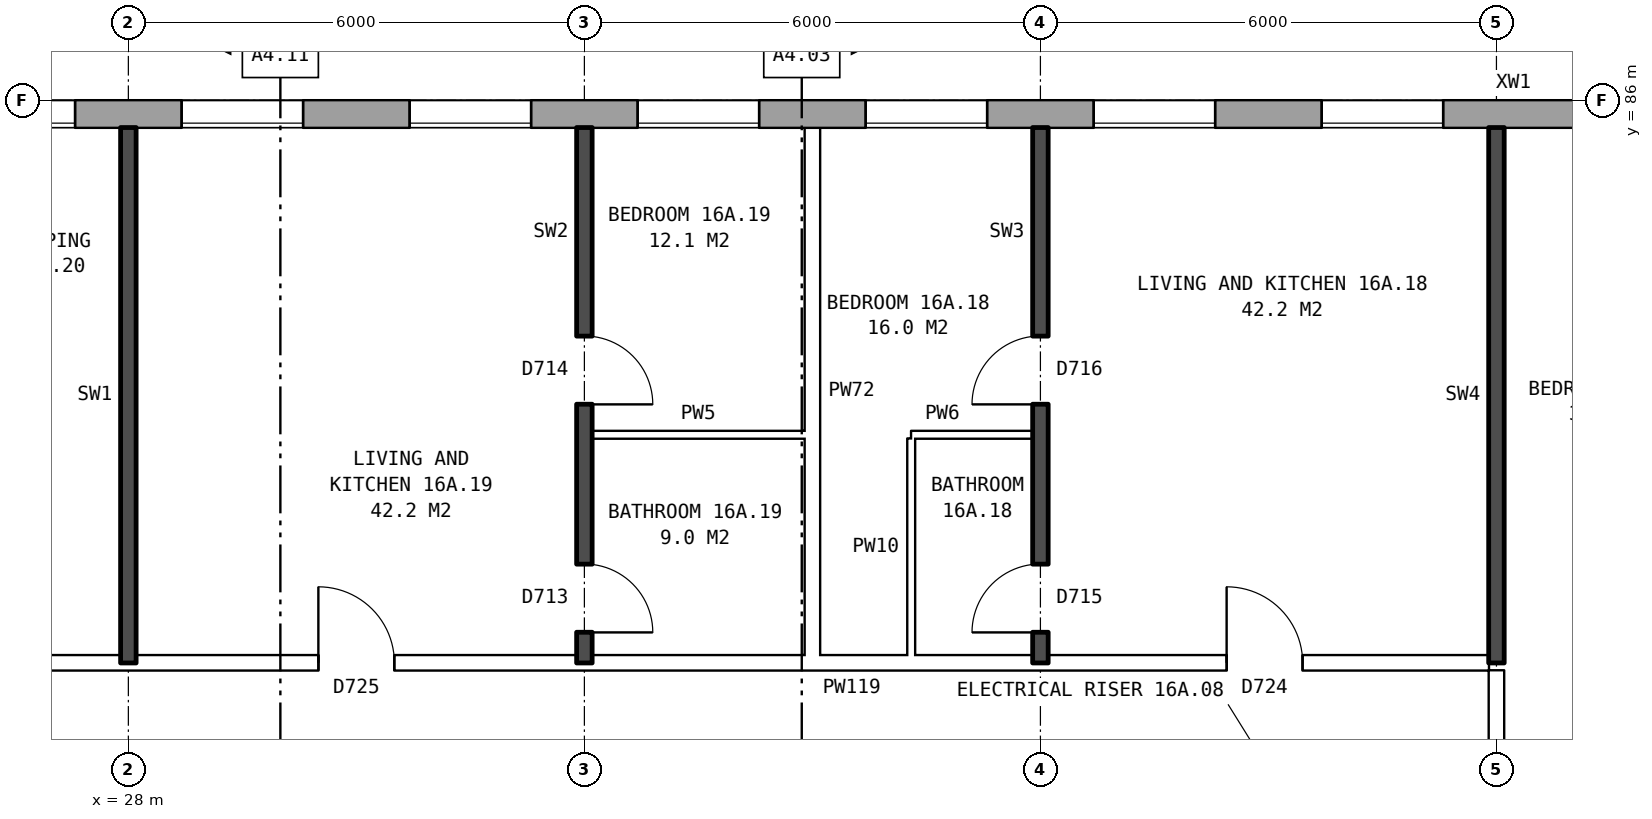
"""IFC4 building model, lengths in metres.
Left out: names, types, materials, properties, quantities, classifications, styles, units other than length and angle.
Written with IfcOpenShell. Run it as: python <this file> out.ifc"""

import sys

from ifc_helpers import new_model, si_unit, direction, frame, frame_2d, origin, place, context, subcontext, project, spatial, rectangle, extrude, element, fill, save


model = new_model("IFC4")
c1 = context("Model", 3, precision=1e-05, world=origin(), true_north=direction((0.0, 1.0)))
c2 = subcontext(c1, "Body", "Model", "MODEL_VIEW")
j1 = project(units=[si_unit("LENGTHUNIT", "METRE"), si_unit("PLANEANGLEUNIT", "RADIAN")], contexts=[c1])
p1 = place(None, origin())
s1 = spatial("IfcSite", under=j1, at=p1, CompositionType="ELEMENT")
p2 = place(p1, origin())
s2 = spatial("IfcBuilding", under=s1, at=p2, CompositionType="ELEMENT")
p3 = place(p2, frame((0.0, 0.0, 59.8)))
s3 = spatial("IfcBuildingStorey", under=s2, at=p3, CompositionType="ELEMENT", Elevation=59.8)
p4 = place(p3, frame((72.925, 85.82, 0.0), z_axis=(0.0, 0.0, 1.0), x_axis=(-1.0, 0.0, 0.0)))
e1 = element("IfcWall", 1, at=p4, inside=s3, PredefinedType="STANDARD", context=c2, shape_type="SweptSolid", body=[
    extrude(rectangle(XDim=48.351, YDim=0.36, at=frame_2d((24.175, 0.0))), origin(), (0.0, 0.0, 1.0), 2.85),
])
p5 = place(p4, frame((0.625, 0.0, 0.8)))
e2 = element("IfcOpeningElement", 2, at=p5, cuts=e1, PredefinedType="OPENING", context=c2, shape_type="SweptSolid", body=[
    extrude(rectangle(XDim=1.6, YDim=1.8, at=frame_2d((0.8, 0.9))), frame((0.0, 0.19, 0.0), z_axis=(0.0, -1.0, 0.0), x_axis=(1.0, 0.0, 0.0)), (0.0, 0.0, 1.0), 0.38),
])
p6 = place(p4, frame((3.625, 0.0, 0.8)))
e3 = element("IfcOpeningElement", 3, at=p6, cuts=e1, PredefinedType="OPENING", context=c2, shape_type="SweptSolid", body=[
    extrude(rectangle(XDim=1.6, YDim=1.8, at=frame_2d((0.8, 0.9))), frame((0.0, 0.19, 0.0), z_axis=(0.0, -1.0, 0.0), x_axis=(1.0, 0.0, 0.0)), (0.0, 0.0, 1.0), 0.38),
])
p7 = place(p4, frame((6.625, 0.0, 0.8)))
e4 = element("IfcOpeningElement", 4, at=p7, cuts=e1, PredefinedType="OPENING", context=c2, shape_type="SweptSolid", body=[
    extrude(rectangle(XDim=1.6, YDim=1.8, at=frame_2d((0.8, 0.9))), frame((0.0, 0.19, 0.0), z_axis=(0.0, -1.0, 0.0), x_axis=(1.0, 0.0, 0.0)), (0.0, 0.0, 1.0), 0.38),
])
p8 = place(p4, frame((9.625, 0.0, 0.8)))
e5 = element("IfcOpeningElement", 5, at=p8, cuts=e1, PredefinedType="OPENING", context=c2, shape_type="SweptSolid", body=[
    extrude(rectangle(XDim=1.6, YDim=1.8, at=frame_2d((0.8, 0.9))), frame((0.0, 0.19, 0.0), z_axis=(0.0, -1.0, 0.0), x_axis=(1.0, 0.0, 0.0)), (0.0, 0.0, 1.0), 0.38),
])
p9 = place(p4, frame((12.625, 0.0, 0.8)))
e6 = element("IfcOpeningElement", 6, at=p9, cuts=e1, PredefinedType="OPENING", context=c2, shape_type="SweptSolid", body=[
    extrude(rectangle(XDim=1.6, YDim=1.8, at=frame_2d((0.8, 0.9))), frame((0.0, 0.19, 0.0), z_axis=(0.0, -1.0, 0.0), x_axis=(1.0, 0.0, 0.0)), (0.0, 0.0, 1.0), 0.38),
])
p10 = place(p4, frame((15.625, 0.0, 0.8)))
e7 = element("IfcOpeningElement", 7, at=p10, cuts=e1, PredefinedType="OPENING", context=c2, shape_type="SweptSolid", body=[
    extrude(rectangle(XDim=1.6, YDim=1.8, at=frame_2d((0.8, 0.9))), frame((0.0, 0.19, 0.0), z_axis=(0.0, -1.0, 0.0), x_axis=(1.0, 0.0, 0.0)), (0.0, 0.0, 1.0), 0.38),
])
p11 = place(p4, frame((18.625, 0.0, 0.8)))
e8 = element("IfcOpeningElement", 8, at=p11, cuts=e1, PredefinedType="OPENING", context=c2, shape_type="SweptSolid", body=[
    extrude(rectangle(XDim=1.6, YDim=1.8, at=frame_2d((0.8, 0.9))), frame((0.0, 0.19, 0.0), z_axis=(0.0, -1.0, 0.0), x_axis=(1.0, 0.0, 0.0)), (0.0, 0.0, 1.0), 0.38),
])
p12 = place(p4, frame((21.125, 0.0, 1.65)))
e9 = element("IfcOpeningElement", 9, at=p12, cuts=e1, PredefinedType="OPENING", context=c2, shape_type="SweptSolid", body=[
    extrude(rectangle(XDim=0.8, YDim=0.9, at=frame_2d((0.4, 0.45))), frame((0.0, 0.19, 0.0), z_axis=(0.0, -1.0, 0.0), x_axis=(1.0, 0.0, 0.0)), (0.0, 0.0, 1.0), 0.38),
])
p13 = place(p4, frame((24.075, 0.0, 0.25)))
e10 = element("IfcOpeningElement", 10, at=p13, cuts=e1, PredefinedType="OPENING", context=c2, shape_type="SweptSolid", body=[
    extrude(rectangle(XDim=0.8, YDim=1.5, at=frame_2d((0.4, 0.75))), frame((0.0, 0.19, 0.0), z_axis=(0.0, -1.0, 0.0), x_axis=(1.0, 0.0, 0.0)), (0.0, 0.0, 1.0), 0.38),
])
p14 = place(p4, frame((27.625, 0.0, 0.8)))
e11 = element("IfcOpeningElement", 11, at=p14, cuts=e1, PredefinedType="OPENING", context=c2, shape_type="SweptSolid", body=[
    extrude(rectangle(XDim=1.6, YDim=1.8, at=frame_2d((0.8, 0.9))), frame((0.0, 0.19, 0.0), z_axis=(0.0, -1.0, 0.0), x_axis=(1.0, 0.0, 0.0)), (0.0, 0.0, 1.0), 0.38),
])
p15 = place(p4, frame((30.625, 0.0, 0.8)))
e12 = element("IfcOpeningElement", 12, at=p15, cuts=e1, PredefinedType="OPENING", context=c2, shape_type="SweptSolid", body=[
    extrude(rectangle(XDim=1.6, YDim=1.8, at=frame_2d((0.8, 0.9))), frame((0.0, 0.19, 0.0), z_axis=(0.0, -1.0, 0.0), x_axis=(1.0, 0.0, 0.0)), (0.0, 0.0, 1.0), 0.38),
])
p16 = place(p4, frame((33.625, 0.0, 0.8)))
e13 = element("IfcOpeningElement", 13, at=p16, cuts=e1, PredefinedType="OPENING", context=c2, shape_type="SweptSolid", body=[
    extrude(rectangle(XDim=1.6, YDim=1.8, at=frame_2d((0.8, 0.9))), frame((0.0, 0.19, 0.0), z_axis=(0.0, -1.0, 0.0), x_axis=(1.0, 0.0, 0.0)), (0.0, 0.0, 1.0), 0.38),
])
p17 = place(p4, frame((36.625, 0.0, 0.8)))
e14 = element("IfcOpeningElement", 14, at=p17, cuts=e1, PredefinedType="OPENING", context=c2, shape_type="SweptSolid", body=[
    extrude(rectangle(XDim=1.6, YDim=1.8, at=frame_2d((0.8, 0.9))), frame((0.0, 0.19, 0.0), z_axis=(0.0, -1.0, 0.0), x_axis=(1.0, 0.0, 0.0)), (0.0, 0.0, 1.0), 0.38),
])
p18 = place(p4, frame((39.625, 0.0, 0.8)))
e15 = element("IfcOpeningElement", 15, at=p18, cuts=e1, PredefinedType="OPENING", context=c2, shape_type="SweptSolid", body=[
    extrude(rectangle(XDim=1.6, YDim=1.8, at=frame_2d((0.8, 0.9))), frame((0.0, 0.19, 0.0), z_axis=(0.0, -1.0, 0.0), x_axis=(1.0, 0.0, 0.0)), (0.0, 0.0, 1.0), 0.38),
])
p19 = place(p4, frame((42.625, 0.0, 0.8)))
e16 = element("IfcOpeningElement", 16, at=p19, cuts=e1, PredefinedType="OPENING", context=c2, shape_type="SweptSolid", body=[
    extrude(rectangle(XDim=1.6, YDim=1.8, at=frame_2d((0.8, 0.9))), frame((0.0, 0.19, 0.0), z_axis=(0.0, -1.0, 0.0), x_axis=(1.0, 0.0, 0.0)), (0.0, 0.0, 1.0), 0.38),
])
p20 = place(p4, frame((45.625, 0.0, 0.8)))
e17 = element("IfcOpeningElement", 17, at=p20, cuts=e1, PredefinedType="OPENING", context=c2, shape_type="SweptSolid", body=[
    extrude(rectangle(XDim=1.6, YDim=1.8, at=frame_2d((0.8, 0.9))), frame((0.0, 0.19, 0.0), z_axis=(0.0, -1.0, 0.0), x_axis=(1.0, 0.0, 0.0)), (0.0, 0.0, 1.0), 0.38),
])
p21 = place(p4, frame((22.425, 0.0, 0.15)))
e18 = element("IfcOpeningElement", 18, at=p21, cuts=e1, PredefinedType="OPENING", context=c2, shape_type="SweptSolid", body=[
    extrude(rectangle(XDim=1.2, YDim=0.9, at=frame_2d((0.6, 0.45))), frame((0.0, 0.19, 0.0), z_axis=(0.0, -1.0, 0.0), x_axis=(1.0, 0.0, 0.0)), (0.0, 0.0, 1.0), 0.38),
])
p22 = place(p4, frame((25.175, 0.0, 0.25)))
e19 = element("IfcOpeningElement", 19, at=p22, cuts=e1, PredefinedType="OPENING", context=c2, shape_type="SweptSolid", body=[
    extrude(rectangle(XDim=0.6, YDim=0.9, at=frame_2d((0.3, 0.45))), frame((0.0, 0.19, 0.0), z_axis=(0.0, -1.0, 0.0), x_axis=(1.0, 0.0, 0.0)), (0.0, 0.0, 1.0), 0.38),
])
p23 = place(p3, frame((21.86, 78.6, 0.0), z_axis=(0.0, 0.0, 1.0), x_axis=(1.0, 0.0, 0.0)))
e20 = element("IfcWall", 20, at=p23, inside=s3, PredefinedType="PARTITIONING", context=c2, shape_type="SweptSolid", body=[
    extrude(rectangle(XDim=24.04, YDim=0.2, at=frame_2d((12.02, 0.0))), origin(), (0.0, 0.0, 1.0), 2.85),
])
p24 = place(p23, frame((20.59, 0.0, 0.0)))
e21 = element("IfcOpeningElement", 21, at=p24, cuts=e20, PredefinedType="OPENING", context=c2, shape_type="SweptSolid", body=[
    extrude(rectangle(XDim=1.0, YDim=2.1, at=frame_2d((0.5, 1.05))), frame((0.0, 0.11, 0.0), z_axis=(0.0, -1.0, 0.0), x_axis=(1.0, 0.0, 0.0)), (0.0, 0.0, 1.0), 0.22),
])
p25 = place(p23, frame((8.64, 0.0, 0.0)))
e22 = element("IfcOpeningElement", 22, at=p25, cuts=e20, PredefinedType="OPENING", context=c2, shape_type="SweptSolid", body=[
    extrude(rectangle(XDim=1.0, YDim=2.1, at=frame_2d((0.5, 1.05))), frame((0.0, 0.11, 0.0), z_axis=(0.0, -1.0, 0.0), x_axis=(1.0, 0.0, 0.0)), (0.0, 0.0, 1.0), 0.22),
])
p26 = place(p23, frame((3.64, 0.0, 0.0)))
e23 = element("IfcOpeningElement", 23, at=p26, cuts=e20, PredefinedType="OPENING", context=c2, shape_type="SweptSolid", body=[
    extrude(rectangle(XDim=1.0, YDim=2.1, at=frame_2d((0.5, 1.05))), frame((0.0, 0.11, 0.0), z_axis=(0.0, -1.0, 0.0), x_axis=(1.0, 0.0, 0.0)), (0.0, 0.0, 1.0), 0.22),
])
p27 = place(p3, frame((34.1, 81.6, 0.0), z_axis=(0.0, 0.0, 1.0), x_axis=(1.0, 0.0, 0.0)))
e24 = element("IfcWall", 24, at=p27, inside=s3, PredefinedType="PARTITIONING", context=c2, shape_type="SweptSolid", body=[
    extrude(rectangle(XDim=2.8, YDim=0.1, at=frame_2d((1.4, 0.0))), origin(), (0.0, 0.0, 1.0), 2.85),
])
p28 = place(p3, frame((38.3, 81.6, 0.0), z_axis=(0.0, 0.0, 1.0), x_axis=(1.0, 0.0, 0.0)))
e25 = element("IfcWall", 25, at=p28, inside=s3, PredefinedType="PARTITIONING", context=c2, shape_type="SweptSolid", body=[
    extrude(rectangle(XDim=1.6, YDim=0.1, at=frame_2d((0.8, 0.0))), origin(), (0.0, 0.0, 1.0), 2.85),
])
p29 = place(p3, frame((28.0, 78.6, 0.0), z_axis=(0.0, 0.0, 1.0), x_axis=(0.0, 1.0, 0.0)))
e26 = element("IfcWall", 26, at=p29, inside=s3, PredefinedType="SOLIDWALL", context=c2, shape_type="SweptSolid", body=[
    extrude(rectangle(XDim=7.04, YDim=0.2, at=frame_2d((3.52, 0.0))), origin(), (0.0, 0.0, 1.0), 2.85),
])
p30 = place(p3, frame((34.0, 78.6, 0.0), z_axis=(0.0, 0.0, 1.0), x_axis=(0.0, 1.0, 0.0)))
e27 = element("IfcWall", 27, at=p30, inside=s3, PredefinedType="SOLIDWALL", context=c2, shape_type="SweptSolid", body=[
    extrude(rectangle(XDim=7.04, YDim=0.2, at=frame_2d((3.52, 0.0))), origin(), (0.0, 0.0, 1.0), 2.85),
])
p31 = place(p30, frame((3.4, 0.0, 0.0)))
e28 = element("IfcOpeningElement", 28, at=p31, cuts=e27, PredefinedType="OPENING", context=c2, shape_type="SweptSolid", body=[
    extrude(rectangle(XDim=0.9, YDim=2.1, at=frame_2d((0.45, 1.05))), frame((0.0, 0.11, 0.0), z_axis=(0.0, -1.0, 0.0), x_axis=(1.0, 0.0, 0.0)), (0.0, 0.0, 1.0), 0.22),
])
p32 = place(p30, frame((0.4, 0.0, 0.0)))
e29 = element("IfcOpeningElement", 29, at=p32, cuts=e27, PredefinedType="OPENING", context=c2, shape_type="SweptSolid", body=[
    extrude(rectangle(XDim=0.9, YDim=2.1, at=frame_2d((0.45, 1.05))), frame((0.0, 0.11, 0.0), z_axis=(0.0, -1.0, 0.0), x_axis=(1.0, 0.0, 0.0)), (0.0, 0.0, 1.0), 0.22),
])
p33 = place(p3, frame((37.0, 78.7, 0.0), z_axis=(0.0, 0.0, 1.0), x_axis=(0.0, 1.0, 0.0)))
e30 = element("IfcWall", 30, at=p33, inside=s3, PredefinedType="PARTITIONING", context=c2, shape_type="SweptSolid", body=[
    extrude(rectangle(XDim=6.94, YDim=0.2, at=frame_2d((3.47, 0.0))), origin(), (0.0, 0.0, 1.0), 2.85),
])
p34 = place(p3, frame((38.3, 78.7, 0.0), z_axis=(0.0, 0.0, 1.0), x_axis=(0.0, 1.0, 0.0)))
e31 = element("IfcWall", 31, at=p34, inside=s3, PredefinedType="PARTITIONING", context=c2, shape_type="SweptSolid", body=[
    extrude(rectangle(XDim=2.85, YDim=0.1, at=frame_2d((1.425, 0.0))), origin(), (0.0, 0.0, 1.0), 2.85),
])
p35 = place(p3, frame((40.0, 78.6, 0.0), z_axis=(0.0, 0.0, 1.0), x_axis=(0.0, 1.0, 0.0)))
e32 = element("IfcWall", 32, at=p35, inside=s3, PredefinedType="SOLIDWALL", context=c2, shape_type="SweptSolid", body=[
    extrude(rectangle(XDim=7.04, YDim=0.2, at=frame_2d((3.52, 0.0))), origin(), (0.0, 0.0, 1.0), 2.85),
])
p36 = place(p35, frame((3.4, 0.0, 0.0)))
e33 = element("IfcOpeningElement", 33, at=p36, cuts=e32, PredefinedType="OPENING", context=c2, shape_type="SweptSolid", body=[
    extrude(rectangle(XDim=0.9, YDim=2.1, at=frame_2d((0.45, 1.05))), frame((0.0, 0.11, 0.0), z_axis=(0.0, -1.0, 0.0), x_axis=(1.0, 0.0, 0.0)), (0.0, 0.0, 1.0), 0.22),
])
p37 = place(p35, frame((0.4, 0.0, 0.0)))
e34 = element("IfcOpeningElement", 34, at=p37, cuts=e32, PredefinedType="OPENING", context=c2, shape_type="SweptSolid", body=[
    extrude(rectangle(XDim=0.9, YDim=2.1, at=frame_2d((0.45, 1.05))), frame((0.0, 0.11, 0.0), z_axis=(0.0, -1.0, 0.0), x_axis=(1.0, 0.0, 0.0)), (0.0, 0.0, 1.0), 0.22),
])
p38 = place(p3, frame((46.0, 76.3, 0.0), z_axis=(0.0, 0.0, 1.0), x_axis=(0.0, 1.0, 0.0)))
e35 = element("IfcWall", 35, at=p38, inside=s3, PredefinedType="PARTITIONING", context=c2, shape_type="SweptSolid", body=[
    extrude(rectangle(XDim=2.2, YDim=0.2, at=frame_2d((1.1, 0.0))), origin(), (0.0, 0.0, 1.0), 2.85),
])
p39 = place(p3, frame((46.0, 78.6, 0.0), z_axis=(0.0, 0.0, 1.0), x_axis=(0.0, 1.0, 0.0)))
e36 = element("IfcWall", 36, at=p39, inside=s3, PredefinedType="SOLIDWALL", context=c2, shape_type="SweptSolid", body=[
    extrude(rectangle(XDim=7.04, YDim=0.2, at=frame_2d((3.52, 0.0))), origin(), (0.0, 0.0, 1.0), 2.85),
])
p40 = place(p14, origin())
e37 = element("IfcWindow", 37, at=p40, inside=s3, PartitioningType="SINGLE_PANEL", PredefinedType="WINDOW", context=c2, shape_type="SweptSolid", body=[
    extrude(rectangle(XDim=1.6, YDim=1.8, at=frame_2d((0.8, 0.9))), frame((0.0, 0.15, 0.0), z_axis=(0.0, -1.0, 0.0), x_axis=(1.0, 0.0, 0.0)), (0.0, 0.0, 1.0), 0.06),
])
fill(e11, e37)
p41 = place(p15, origin())
e38 = element("IfcWindow", 38, at=p41, inside=s3, PartitioningType="SINGLE_PANEL", PredefinedType="WINDOW", context=c2, shape_type="SweptSolid", body=[
    extrude(rectangle(XDim=1.6, YDim=1.8, at=frame_2d((0.8, 0.9))), frame((0.0, 0.15, 0.0), z_axis=(0.0, -1.0, 0.0), x_axis=(1.0, 0.0, 0.0)), (0.0, 0.0, 1.0), 0.06),
])
fill(e12, e38)
p42 = place(p16, origin())
e39 = element("IfcWindow", 39, at=p42, inside=s3, PartitioningType="SINGLE_PANEL", PredefinedType="WINDOW", context=c2, shape_type="SweptSolid", body=[
    extrude(rectangle(XDim=1.6, YDim=1.8, at=frame_2d((0.8, 0.9))), frame((0.0, 0.15, 0.0), z_axis=(0.0, -1.0, 0.0), x_axis=(1.0, 0.0, 0.0)), (0.0, 0.0, 1.0), 0.06),
])
fill(e13, e39)
p43 = place(p17, origin())
e40 = element("IfcWindow", 40, at=p43, inside=s3, PartitioningType="SINGLE_PANEL", PredefinedType="WINDOW", context=c2, shape_type="SweptSolid", body=[
    extrude(rectangle(XDim=1.6, YDim=1.8, at=frame_2d((0.8, 0.9))), frame((0.0, 0.15, 0.0), z_axis=(0.0, -1.0, 0.0), x_axis=(1.0, 0.0, 0.0)), (0.0, 0.0, 1.0), 0.06),
])
fill(e14, e40)
p44 = place(p18, origin())
e41 = element("IfcWindow", 41, at=p44, inside=s3, PartitioningType="SINGLE_PANEL", PredefinedType="WINDOW", context=c2, shape_type="SweptSolid", body=[
    extrude(rectangle(XDim=1.6, YDim=1.8, at=frame_2d((0.8, 0.9))), frame((0.0, 0.15, 0.0), z_axis=(0.0, -1.0, 0.0), x_axis=(1.0, 0.0, 0.0)), (0.0, 0.0, 1.0), 0.06),
])
fill(e15, e41)
p45 = place(p19, origin())
e42 = element("IfcWindow", 42, at=p45, inside=s3, PartitioningType="SINGLE_PANEL", PredefinedType="WINDOW", context=c2, shape_type="SweptSolid", body=[
    extrude(rectangle(XDim=1.6, YDim=1.8, at=frame_2d((0.8, 0.9))), frame((0.0, 0.15, 0.0), z_axis=(0.0, -1.0, 0.0), x_axis=(1.0, 0.0, 0.0)), (0.0, 0.0, 1.0), 0.06),
])
fill(e16, e42)
p46 = place(p20, origin())
e43 = element("IfcWindow", 43, at=p46, inside=s3, PartitioningType="SINGLE_PANEL", PredefinedType="WINDOW", context=c2, shape_type="SweptSolid", body=[
    extrude(rectangle(XDim=1.6, YDim=1.8, at=frame_2d((0.8, 0.9))), frame((0.0, 0.15, 0.0), z_axis=(0.0, -1.0, 0.0), x_axis=(1.0, 0.0, 0.0)), (0.0, 0.0, 1.0), 0.06),
])
fill(e17, e43)
p47 = place(p36, origin())
e44 = element("IfcDoor", 44, at=p47, inside=s3, OperationType="SINGLE_SWING_LEFT", PredefinedType="DOOR", context=c2, shape_type="SweptSolid", body=[
    extrude(rectangle(XDim=0.9, YDim=2.1, at=frame_2d((0.45, 1.05))), frame((0.0, 0.025, 0.0), z_axis=(0.0, -1.0, 0.0), x_axis=(1.0, 0.0, 0.0)), (0.0, 0.0, 1.0), 0.05),
])
fill(e33, e44)
p48 = place(p24, origin())
e45 = element("IfcDoor", 45, at=p48, inside=s3, OperationType="SINGLE_SWING_LEFT", PredefinedType="DOOR", context=c2, shape_type="SweptSolid", body=[
    extrude(rectangle(XDim=1.0, YDim=2.1, at=frame_2d((0.5, 1.05))), frame((0.0, 0.025, 0.0), z_axis=(0.0, -1.0, 0.0), x_axis=(1.0, 0.0, 0.0)), (0.0, 0.0, 1.0), 0.05),
])
fill(e21, e45)
p49 = place(p37, origin())
e46 = element("IfcDoor", 46, at=p49, inside=s3, OperationType="SINGLE_SWING_LEFT", PredefinedType="DOOR", context=c2, shape_type="SweptSolid", body=[
    extrude(rectangle(XDim=0.9, YDim=2.1, at=frame_2d((0.45, 1.05))), frame((0.0, 0.025, 0.0), z_axis=(0.0, -1.0, 0.0), x_axis=(1.0, 0.0, 0.0)), (0.0, 0.0, 1.0), 0.05),
])
fill(e34, e46)
p50 = place(p31, frame((0.9, 0.0, 0.0), z_axis=(0.0, 0.0, 1.0), x_axis=(-1.0, 0.0, 0.0)))
e47 = element("IfcDoor", 47, at=p50, inside=s3, OperationType="SINGLE_SWING_RIGHT", PredefinedType="DOOR", context=c2, shape_type="SweptSolid", body=[
    extrude(rectangle(XDim=0.9, YDim=2.1, at=frame_2d((0.45, 1.05))), frame((0.0, 0.025, 0.0), z_axis=(0.0, -1.0, 0.0), x_axis=(1.0, 0.0, 0.0)), (0.0, 0.0, 1.0), 0.05),
])
fill(e28, e47)
p51 = place(p25, origin())
e48 = element("IfcDoor", 48, at=p51, inside=s3, OperationType="SINGLE_SWING_LEFT", PredefinedType="DOOR", context=c2, shape_type="SweptSolid", body=[
    extrude(rectangle(XDim=1.0, YDim=2.1, at=frame_2d((0.5, 1.05))), frame((0.0, 0.025, 0.0), z_axis=(0.0, -1.0, 0.0), x_axis=(1.0, 0.0, 0.0)), (0.0, 0.0, 1.0), 0.05),
])
fill(e22, e48)
p52 = place(p32, frame((0.9, 0.0, 0.0), z_axis=(0.0, 0.0, 1.0), x_axis=(-1.0, 0.0, 0.0)))
e49 = element("IfcDoor", 49, at=p52, inside=s3, OperationType="SINGLE_SWING_RIGHT", PredefinedType="DOOR", context=c2, shape_type="SweptSolid", body=[
    extrude(rectangle(XDim=0.9, YDim=2.1, at=frame_2d((0.45, 1.05))), frame((0.0, 0.025, 0.0), z_axis=(0.0, -1.0, 0.0), x_axis=(1.0, 0.0, 0.0)), (0.0, 0.0, 1.0), 0.05),
])
fill(e29, e49)
save(model, sys.argv[1])
